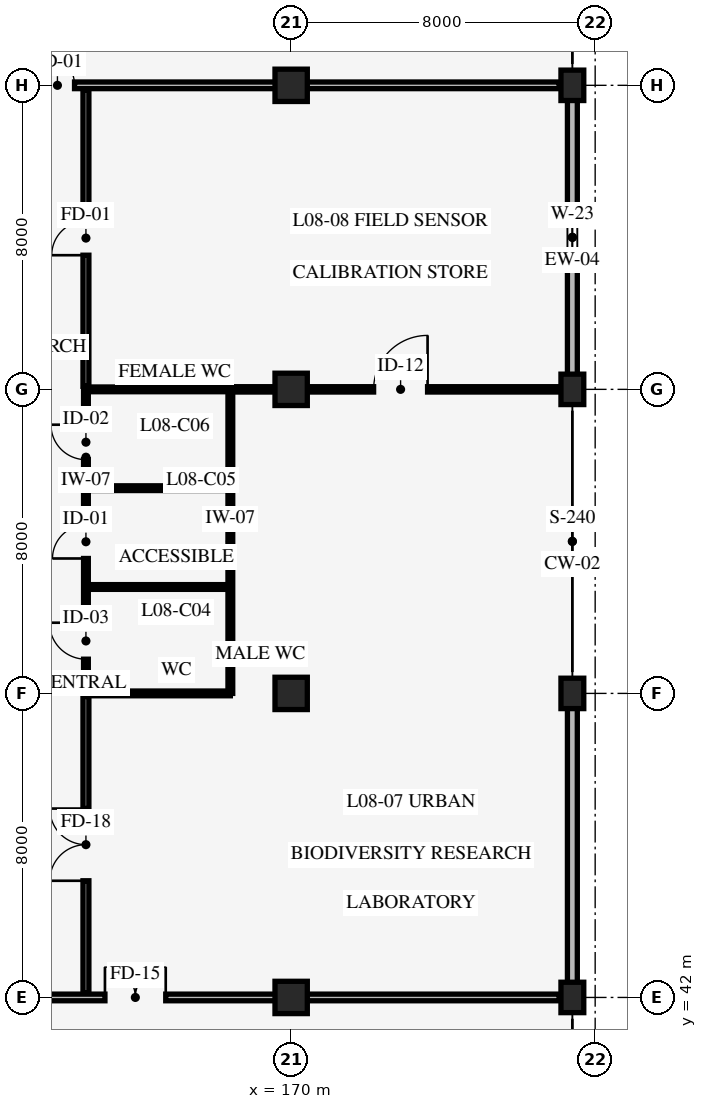
"""IFC4 building model, lengths in metres.
Left out: names, types, materials, properties, quantities, classifications, styles, units other than length and angle.
Written with IfcOpenShell. Run it as: python <this file> out.ifc"""

import sys

from ifc_helpers import new_model, si_unit, direction, frame, frame_2d, origin, origin_2d, place, context, subcontext, project, spatial, rectangle, extrude, element, fill, save


model = new_model("IFC4")
c1 = context("Model", 3, precision=1e-05, world=origin(), true_north=direction((0.0, 1.0)))
c2 = subcontext(c1, "Body", "Model", "MODEL_VIEW")
j1 = project(units=[si_unit("LENGTHUNIT", "METRE"), si_unit("PLANEANGLEUNIT", "RADIAN")], contexts=[c1])
p1 = place(None, origin())
s1 = spatial("IfcSite", under=j1, at=p1, CompositionType="ELEMENT")
p2 = place(p1, origin())
s2 = spatial("IfcBuilding", under=s1, at=p2, CompositionType="ELEMENT")
p3 = place(p2, frame((0.0, 0.0, 31.8)))
s3 = spatial("IfcBuildingStorey", under=s2, at=p3, CompositionType="ELEMENT", Elevation=31.8)
for number, where, z_axis, x_axis in (
    (1, (170.0, 42.0, 0.0), (0.0, 0.0, 1.0), (1.0, 0.0, 0.0)),
    (2, (170.0, 50.0, 0.0), (0.0, 0.0, 1.0), (1.0, 0.0, 0.0)),
    (3, (170.0, 58.0, 0.0), (0.0, 0.0, 1.0), (1.0, 0.0, 0.0)),
    (4, (170.0, 66.0, 0.0), (0.0, 0.0, 1.0), (1.0, 0.0, 0.0)),
):
    element("IfcColumn", number, at=place(p3, frame(where, z_axis=z_axis, x_axis=x_axis)), inside=s3, PredefinedType="COLUMN", context=c2, shape_type="SweptSolid", body=[
        extrude(rectangle(XDim=0.85, YDim=0.85, at=origin_2d()), origin(), (0.0, 0.0, 1.0), 4.2),
    ])
for number, where, z_axis, x_axis in (
    (5, (177.4, 42.0, 0.0), (0.0, 0.0, 1.0), (1.0, 0.0, 0.0)),
    (6, (177.4, 50.0, 0.0), (0.0, 0.0, 1.0), (1.0, 0.0, 0.0)),
    (7, (177.4, 58.0, 0.0), (0.0, 0.0, 1.0), (1.0, 0.0, 0.0)),
    (8, (177.4, 66.0, 0.0), (0.0, 0.0, 1.0), (1.0, 0.0, 0.0)),
):
    element("IfcColumn", number, at=place(p3, frame(where, z_axis=z_axis, x_axis=x_axis)), inside=s3, PredefinedType="COLUMN", context=c2, shape_type="SweptSolid", body=[
        extrude(rectangle(XDim=0.6, YDim=0.8, at=origin_2d()), origin(), (0.0, 0.0, 1.0), 4.2),
    ])
p4 = place(p3, frame((177.4, 66.0, 0.0), z_axis=(0.0, 0.0, 1.0), x_axis=(0.0, -1.0, 0.0)))
e9 = element("IfcWall", 9, at=p4, inside=s3, PredefinedType="STANDARD", context=c2, shape_type="SweptSolid", body=[
    extrude(rectangle(XDim=8.0, YDim=0.26, at=frame_2d((4.0, 0.0))), origin(), (0.0, 0.0, 1.0), 3.31),
])
p5 = place(p4, frame((3.15, 0.0, 0.85)))
e10 = element("IfcOpeningElement", 10, at=p5, cuts=e9, PredefinedType="OPENING", context=c2, shape_type="SweptSolid", body=[
    extrude(rectangle(XDim=1.7, YDim=1.2, at=frame_2d((0.85, 0.6))), frame((0.0, 0.14, 0.0), z_axis=(0.0, -1.0, 0.0), x_axis=(1.0, 0.0, 0.0)), (0.0, 0.0, 1.0), 0.28),
])
p6 = place(p3, frame((177.4, 50.0, 0.0), z_axis=(0.0, 0.0, 1.0), x_axis=(0.0, -1.0, 0.0)))
e11 = element("IfcWall", 11, at=p6, inside=s3, PredefinedType="STANDARD", context=c2, shape_type="SweptSolid", body=[
    extrude(rectangle(XDim=8.0, YDim=0.26, at=frame_2d((4.0, 0.0))), origin(), (0.0, 0.0, 1.0), 3.31),
])
p7 = place(p3, frame((164.6, 50.0, 0.0), z_axis=(0.0, 0.0, 1.0), x_axis=(0.0, 1.0, 0.0)))
e12 = element("IfcWall", 12, at=p7, inside=s3, PredefinedType="STANDARD", context=c2, shape_type="SweptSolid", body=[
    extrude(rectangle(XDim=8.0, YDim=0.125, at=frame_2d((4.0, 0.0))), origin(), (0.0, 0.0, 1.0), 3.9),
])
p8 = place(p7, frame((0.9, 0.0, 0.0)))
e13 = element("IfcOpeningElement", 13, at=p8, cuts=e12, PredefinedType="OPENING", context=c2, shape_type="SweptSolid", body=[
    extrude(rectangle(XDim=0.96, YDim=2.08, at=frame_2d((0.48, 1.04))), frame((0.0, 0.073, 0.0), z_axis=(0.0, -1.0, 0.0), x_axis=(1.0, 0.0, 0.0)), (0.0, 0.0, 1.0), 0.145),
])
p9 = place(p7, frame((3.55, 0.0, 0.0)))
e14 = element("IfcOpeningElement", 14, at=p9, cuts=e12, PredefinedType="OPENING", context=c2, shape_type="SweptSolid", body=[
    extrude(rectangle(XDim=0.88, YDim=2.05, at=frame_2d((0.44, 1.025))), frame((0.0, 0.073, 0.0), z_axis=(0.0, -1.0, 0.0), x_axis=(1.0, 0.0, 0.0)), (0.0, 0.0, 1.0), 0.145),
])
p10 = place(p7, frame((6.15, 0.0, 0.0)))
e15 = element("IfcOpeningElement", 15, at=p10, cuts=e12, PredefinedType="OPENING", context=c2, shape_type="SweptSolid", body=[
    extrude(rectangle(XDim=0.92, YDim=2.05, at=frame_2d((0.46, 1.025))), frame((0.0, 0.073, 0.0), z_axis=(0.0, -1.0, 0.0), x_axis=(1.0, 0.0, 0.0)), (0.0, 0.0, 1.0), 0.145),
])
p11 = place(p3, frame((168.4, 50.0, 0.0), z_axis=(0.0, 0.0, 1.0), x_axis=(0.0, 1.0, 0.0)))
e16 = element("IfcWall", 16, at=p11, inside=s3, PredefinedType="STANDARD", context=c2, shape_type="SweptSolid", body=[
    extrude(rectangle(XDim=8.0, YDim=0.125, at=frame_2d((4.0, 0.0))), origin(), (0.0, 0.0, 1.0), 3.9),
])
p12 = place(p3, frame((164.6, 50.0, 0.0), z_axis=(0.0, 0.0, 1.0), x_axis=(1.0, 0.0, 0.0)))
e17 = element("IfcWall", 17, at=p12, inside=s3, PredefinedType="STANDARD", context=c2, shape_type="SweptSolid", body=[
    extrude(rectangle(XDim=3.8, YDim=0.125, at=frame_2d((1.9, 0.0))), origin(), (0.0, 0.0, 1.0), 3.26),
])
for number, where, z_axis, x_axis in (
    (18, (164.6, 52.8, 0.0), (0.0, 0.0, 1.0), (1.0, 0.0, 0.0)),
    (19, (164.6, 55.4, 0.0), (0.0, 0.0, 1.0), (1.0, 0.0, 0.0)),
):
    element("IfcWall", number, at=place(p3, frame(where, z_axis=z_axis, x_axis=x_axis)), inside=s3, PredefinedType="STANDARD", context=c2, shape_type="SweptSolid", body=[
        extrude(rectangle(XDim=3.8, YDim=0.125, at=frame_2d((1.9, 0.0))), origin(), (0.0, 0.0, 1.0), 3.9),
    ])
p13 = place(p3, frame((164.6, 58.0, 0.0), z_axis=(0.0, 0.0, 1.0), x_axis=(1.0, 0.0, 0.0)))
e20 = element("IfcWall", 20, at=p13, inside=s3, PredefinedType="STANDARD", context=c2, shape_type="SweptSolid", body=[
    extrude(rectangle(XDim=3.8, YDim=0.125, at=frame_2d((1.9, 0.0))), origin(), (0.0, 0.0, 1.0), 3.26),
])
p14 = place(p3, frame((164.6, 42.12, 0.0), z_axis=(0.0, 0.0, 1.0), x_axis=(0.0, 1.0, 0.0)))
e21 = element("IfcWall", 21, at=p14, inside=s3, PredefinedType="STANDARD", context=c2, shape_type="SweptSolid", body=[
    extrude(rectangle(XDim=7.8, YDim=0.155, at=frame_2d((3.9, 0.0))), origin(), (0.0, 0.0, 1.0), 3.9),
])
p15 = place(p14, frame((2.95, 0.0, 0.0)))
e22 = element("IfcOpeningElement", 22, at=p15, cuts=e21, PredefinedType="OPENING", context=c2, shape_type="SweptSolid", body=[
    extrude(rectangle(XDim=1.9, YDim=2.35, at=frame_2d((0.95, 1.175))), frame((0.0, 0.087, 0.0), z_axis=(0.0, -1.0, 0.0), x_axis=(1.0, 0.0, 0.0)), (0.0, 0.0, 1.0), 0.175),
])
p16 = place(p3, frame((168.4, 58.0, 0.0), z_axis=(0.0, 0.0, 1.0), x_axis=(1.0, 0.0, 0.0)))
e23 = element("IfcWall", 23, at=p16, inside=s3, PredefinedType="STANDARD", context=c2, shape_type="SweptSolid", body=[
    extrude(rectangle(XDim=8.96, YDim=0.14, at=frame_2d((4.48, 0.0))), origin(), (0.0, 0.0, 1.0), 3.26),
])
p17 = place(p16, frame((3.77, 0.0, 0.0)))
e24 = element("IfcOpeningElement", 24, at=p17, cuts=e23, PredefinedType="OPENING", context=c2, shape_type="SweptSolid", body=[
    extrude(rectangle(XDim=1.42, YDim=2.18, at=frame_2d((0.71, 1.09))), frame((0.0, 0.08, 0.0), z_axis=(0.0, -1.0, 0.0), x_axis=(1.0, 0.0, 0.0)), (0.0, 0.0, 1.0), 0.16),
])
p18 = place(p3, frame((164.6, 58.08, 0.0), z_axis=(0.0, 0.0, 1.0), x_axis=(0.0, 1.0, 0.0)))
e25 = element("IfcWall", 25, at=p18, inside=s3, PredefinedType="STANDARD", context=c2, shape_type="SweptSolid", body=[
    extrude(rectangle(XDim=7.8, YDim=0.155, at=frame_2d((3.9, 0.0))), origin(), (0.0, 0.0, 1.0), 3.9),
])
p19 = place(p18, frame((3.45, 0.0, 0.0)))
e26 = element("IfcOpeningElement", 26, at=p19, cuts=e25, PredefinedType="OPENING", context=c2, shape_type="SweptSolid", body=[
    extrude(rectangle(XDim=0.9, YDim=2.1, at=frame_2d((0.45, 1.05))), frame((0.0, 0.087, 0.0), z_axis=(0.0, -1.0, 0.0), x_axis=(1.0, 0.0, 0.0)), (0.0, 0.0, 1.0), 0.175),
])
p20 = place(p3, frame((162.35, 42.0, 0.0), z_axis=(0.0, 0.0, 1.0), x_axis=(1.0, 0.0, 0.0)))
e27 = element("IfcWall", 27, at=p20, inside=s3, PredefinedType="STANDARD", context=c2, shape_type="SweptSolid", body=[
    extrude(rectangle(XDim=14.7, YDim=0.175, at=frame_2d((7.35, 0.0))), origin(), (0.0, 0.0, 1.0), 3.26),
])
p21 = place(p20, frame((2.75, 0.0, 0.0)))
e28 = element("IfcOpeningElement", 28, at=p21, cuts=e27, PredefinedType="OPENING", context=c2, shape_type="SweptSolid", body=[
    extrude(rectangle(XDim=1.6, YDim=2.25, at=frame_2d((0.8, 1.125))), frame((0.0, 0.098, 0.0), z_axis=(0.0, -1.0, 0.0), x_axis=(1.0, 0.0, 0.0)), (0.0, 0.0, 1.0), 0.195),
])
p22 = place(p3, frame((162.35, 66.0, 0.0), z_axis=(0.0, 0.0, 1.0), x_axis=(1.0, 0.0, 0.0)))
e29 = element("IfcWall", 29, at=p22, inside=s3, PredefinedType="STANDARD", context=c2, shape_type="SweptSolid", body=[
    extrude(rectangle(XDim=14.7, YDim=0.175, at=frame_2d((7.35, 0.0))), origin(), (0.0, 0.0, 1.0), 3.26),
])
p23 = place(p22, frame((1.05, 0.0, 0.0)))
e30 = element("IfcOpeningElement", 30, at=p23, cuts=e29, PredefinedType="OPENING", context=c2, shape_type="SweptSolid", body=[
    extrude(rectangle(XDim=0.9, YDim=2.1, at=frame_2d((0.45, 1.05))), frame((0.0, 0.098, 0.0), z_axis=(0.0, -1.0, 0.0), x_axis=(1.0, 0.0, 0.0)), (0.0, 0.0, 1.0), 0.195),
])
p24 = place(p5, origin())
e31 = element("IfcWindow", 31, at=p24, inside=s3, PartitioningType="SINGLE_PANEL", PredefinedType="WINDOW", context=c2, shape_type="SweptSolid", body=[
    extrude(rectangle(XDim=1.7, YDim=1.2, at=frame_2d((0.85, 0.6))), frame((0.0, 0.03, 0.0), z_axis=(0.0, -1.0, 0.0), x_axis=(1.0, 0.0, 0.0)), (0.0, 0.0, 1.0), 0.06),
])
fill(e10, e31)
p25 = place(p8, origin())
e32 = element("IfcDoor", 32, at=p25, inside=s3, OperationType="SINGLE_SWING_RIGHT", PredefinedType="DOOR", context=c2, shape_type="SweptSolid", body=[
    extrude(rectangle(XDim=0.96, YDim=2.08, at=frame_2d((0.48, 1.04))), frame((0.0, 0.025, 0.0), z_axis=(0.0, -1.0, 0.0), x_axis=(1.0, 0.0, 0.0)), (0.0, 0.0, 1.0), 0.05),
])
fill(e13, e32)
p26 = place(p9, origin())
e33 = element("IfcDoor", 33, at=p26, inside=s3, OperationType="SINGLE_SWING_LEFT", PredefinedType="DOOR", context=c2, shape_type="SweptSolid", body=[
    extrude(rectangle(XDim=0.88, YDim=2.05, at=frame_2d((0.44, 1.025))), frame((0.0, 0.025, 0.0), z_axis=(0.0, -1.0, 0.0), x_axis=(1.0, 0.0, 0.0)), (0.0, 0.0, 1.0), 0.05),
])
fill(e14, e33)
p27 = place(p10, origin())
e34 = element("IfcDoor", 34, at=p27, inside=s3, OperationType="SINGLE_SWING_RIGHT", PredefinedType="DOOR", context=c2, shape_type="SweptSolid", body=[
    extrude(rectangle(XDim=0.92, YDim=2.05, at=frame_2d((0.46, 1.025))), frame((0.0, 0.025, 0.0), z_axis=(0.0, -1.0, 0.0), x_axis=(1.0, 0.0, 0.0)), (0.0, 0.0, 1.0), 0.05),
])
fill(e15, e34)
p28 = place(p15, origin())
e35 = element("IfcDoor", 35, at=p28, inside=s3, OperationType="DOUBLE_DOOR_SINGLE_SWING", PredefinedType="DOOR", context=c2, shape_type="SweptSolid", body=[
    extrude(rectangle(XDim=1.9, YDim=2.35, at=frame_2d((0.95, 1.175))), frame((0.0, 0.025, 0.0), z_axis=(0.0, -1.0, 0.0), x_axis=(1.0, 0.0, 0.0)), (0.0, 0.0, 1.0), 0.05),
])
fill(e22, e35)
p29 = place(p17, origin())
e36 = element("IfcDoor", 36, at=p29, inside=s3, OperationType="SINGLE_SWING_RIGHT", PredefinedType="DOOR", context=c2, shape_type="SweptSolid", body=[
    extrude(rectangle(XDim=1.42, YDim=2.18, at=frame_2d((0.71, 1.09))), frame((0.0, 0.025, 0.0), z_axis=(0.0, -1.0, 0.0), x_axis=(1.0, 0.0, 0.0)), (0.0, 0.0, 1.0), 0.05),
])
fill(e24, e36)
p30 = place(p19, origin())
e37 = element("IfcDoor", 37, at=p30, inside=s3, OperationType="SINGLE_SWING_LEFT", PredefinedType="DOOR", context=c2, shape_type="SweptSolid", body=[
    extrude(rectangle(XDim=0.9, YDim=2.1, at=frame_2d((0.45, 1.05))), frame((0.0, 0.025, 0.0), z_axis=(0.0, -1.0, 0.0), x_axis=(1.0, 0.0, 0.0)), (0.0, 0.0, 1.0), 0.05),
])
fill(e26, e37)
p31 = place(p21, origin())
e38 = element("IfcDoor", 38, at=p31, inside=s3, OperationType="DOUBLE_DOOR_SINGLE_SWING", PredefinedType="DOOR", context=c2, shape_type="SweptSolid", body=[
    extrude(rectangle(XDim=1.6, YDim=2.25, at=frame_2d((0.8, 1.125))), frame((0.0, 0.025, 0.0), z_axis=(0.0, -1.0, 0.0), x_axis=(1.0, 0.0, 0.0)), (0.0, 0.0, 1.0), 0.05),
])
fill(e28, e38)
p32 = place(p23, origin())
e39 = element("IfcDoor", 39, at=p32, inside=s3, OperationType="SINGLE_SWING_LEFT", PredefinedType="DOOR", context=c2, shape_type="SweptSolid", body=[
    extrude(rectangle(XDim=0.9, YDim=2.1, at=frame_2d((0.45, 1.05))), frame((0.0, 0.025, 0.0), z_axis=(0.0, -1.0, 0.0), x_axis=(1.0, 0.0, 0.0)), (0.0, 0.0, 1.0), 0.05),
])
fill(e30, e39)
save(model, sys.argv[1])
